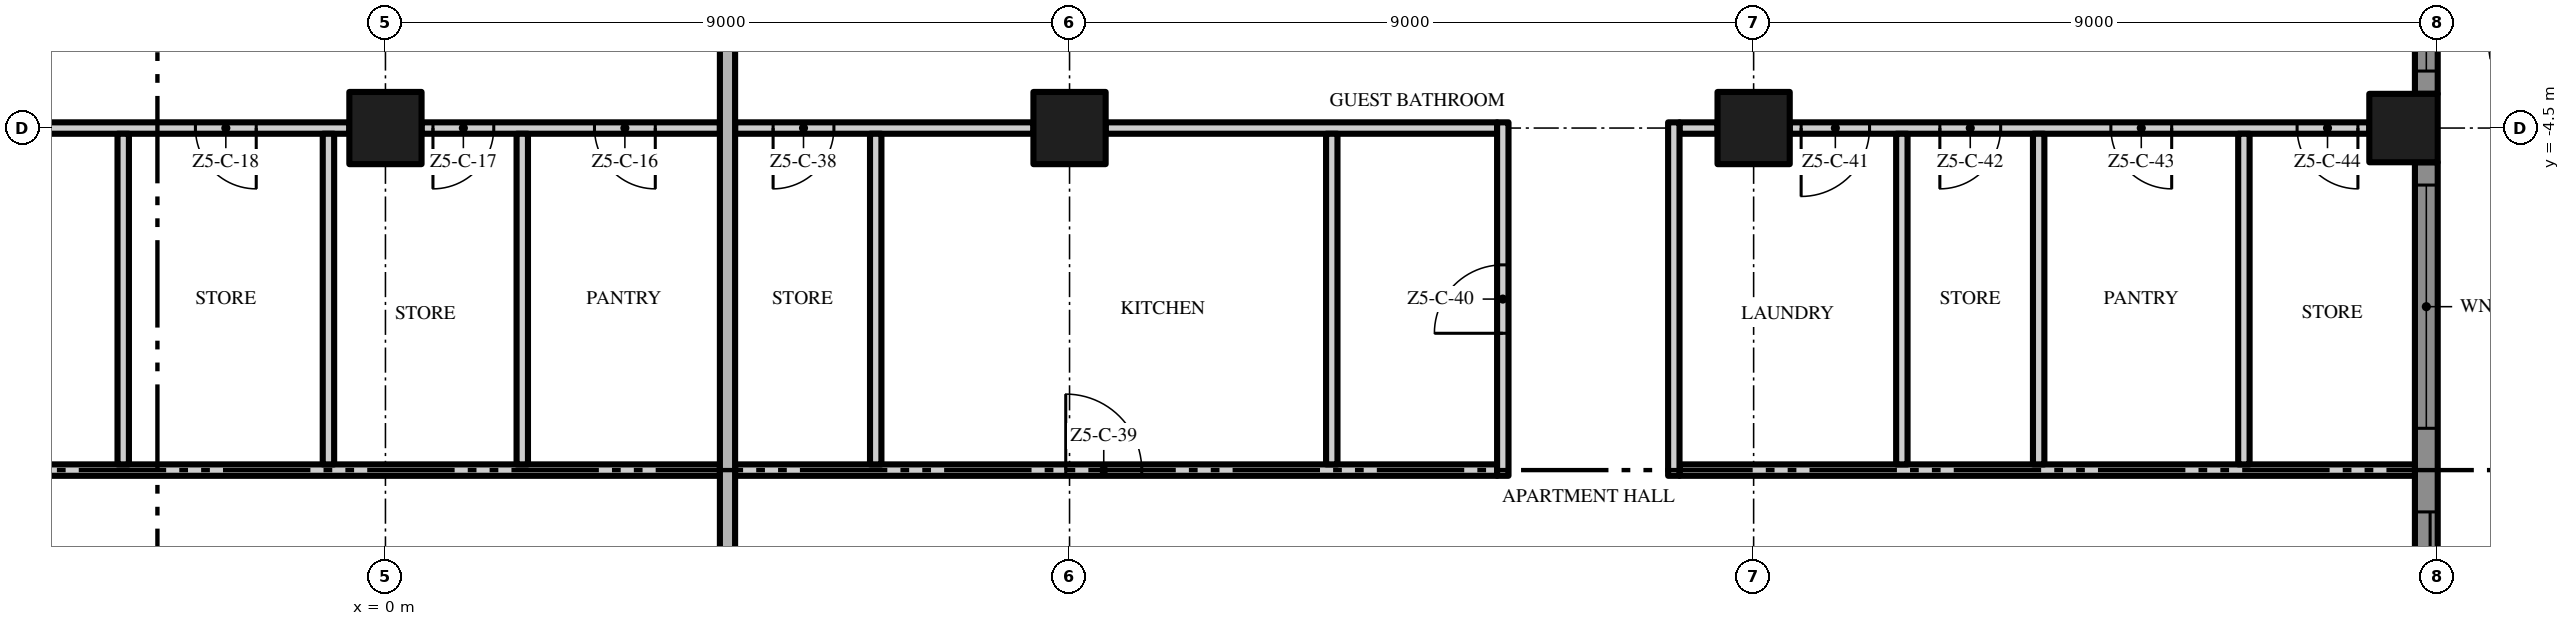
"""IFC4 building model, lengths in metres.
Left out: names, types, materials, properties, quantities, classifications, styles, units other than length and angle.
Written with IfcOpenShell. Run it as: python <this file> out.ifc"""

import sys

from ifc_helpers import new_model, si_unit, direction, frame, frame_2d, origin, origin_2d, place, context, subcontext, project, spatial, polyline, rectangle, outline, extrude, element, fill, save


model = new_model("IFC4")
c1 = context("Model", 3, precision=1e-05, world=origin(), true_north=direction((0.0, 1.0)))
c2 = subcontext(c1, "Body", "Model", "MODEL_VIEW")
j1 = project(units=[si_unit("LENGTHUNIT", "METRE"), si_unit("PLANEANGLEUNIT", "RADIAN")], contexts=[c1])
p1 = place(None, origin())
s1 = spatial("IfcSite", under=j1, at=p1, CompositionType="ELEMENT")
p2 = place(p1, origin())
s2 = spatial("IfcBuilding", under=s1, at=p2, CompositionType="ELEMENT")
p3 = place(p2, frame((0.0, 0.0, 265.4)))
s3 = spatial("IfcBuildingStorey", under=s2, at=p3, CompositionType="ELEMENT", Elevation=265.4)
for number, where, z_axis, x_axis in (
    (1, (0.0, -4.5, 0.0), (0.0, 0.0, 1.0), (1.0, 0.0, 0.0)),
    (2, (18.0, -4.5, 0.0), (0.0, 0.0, 1.0), (1.0, 0.0, 0.0)),
):
    element("IfcColumn", number, at=place(p3, frame(where, z_axis=z_axis, x_axis=x_axis)), inside=s3, PredefinedType="COLUMN", context=c2, shape_type="SweptSolid", body=[
        extrude(rectangle(XDim=0.95, YDim=0.95, at=origin_2d()), origin(), (0.0, 0.0, 1.0), 3.5),
    ])
p4 = place(p3, frame((26.55, -4.5, 0.0), z_axis=(0.0, 0.0, 1.0), x_axis=(1.0, 0.0, 0.0)))
e3 = element("IfcColumn", 3, at=p4, inside=s3, PredefinedType="COLUMN", context=c2, shape_type="SweptSolid", body=[
    extrude(rectangle(XDim=0.9, YDim=0.9, at=origin_2d()), origin(), (0.0, 0.0, 1.0), 3.5),
])
p5 = place(p3, frame((9.0, -4.5, 0.0), z_axis=(0.0, 0.0, 1.0), x_axis=(1.0, 0.0, 0.0)))
e4 = element("IfcColumn", 4, at=p5, inside=s3, PredefinedType="COLUMN", context=c2, shape_type="SweptSolid", body=[
    extrude(rectangle(XDim=0.95, YDim=0.95, at=origin_2d()), origin(), (0.0, 0.0, 1.0), 3.5),
])
p6 = place(p3, frame((26.85, -4.95, 0.0), z_axis=(0.0, 0.0, 1.0), x_axis=(0.0, -1.0, 0.0)))
e5 = element("IfcWall", 5, at=p6, inside=s3, PredefinedType="SOLIDWALL", context=c2, shape_type="SweptSolid", body=[
    extrude(rectangle(XDim=8.1, YDim=0.3, at=frame_2d((4.05, 0.0))), origin(), (0.0, 0.0, 1.0), 3.5),
])
p7 = place(p6, frame((4.6, 0.0, 0.0)))
e6 = element("IfcOpeningElement", 6, at=p7, cuts=e5, PredefinedType="OPENING", context=c2, shape_type="SweptSolid", body=[
    extrude(rectangle(XDim=3.2, YDim=2.4, at=frame_2d((1.6, 1.2))), frame((0.0, 0.16, 0.0), z_axis=(0.0, -1.0, 0.0), x_axis=(1.0, 0.0, 0.0)), (0.0, 0.0, 1.0), 0.32),
])
p8 = place(p6, frame((0.3, 0.0, 0.45)))
e7 = element("IfcOpeningElement", 7, at=p8, cuts=e5, PredefinedType="OPENING", context=c2, shape_type="SweptSolid", body=[
    extrude(rectangle(XDim=3.2, YDim=2.65, at=frame_2d((1.6, 1.325))), frame((0.0, 0.16, 0.0), z_axis=(0.0, -1.0, 0.0), x_axis=(1.0, 0.0, 0.0)), (0.0, 0.0, 1.0), 0.32),
])
p9 = place(p3, frame((26.85, 4.05, 0.0), z_axis=(0.0, 0.0, 1.0), x_axis=(0.0, -1.0, 0.0)))
e8 = element("IfcWall", 8, at=p9, inside=s3, PredefinedType="SOLIDWALL", context=c2, shape_type="SweptSolid", body=[
    extrude(rectangle(XDim=8.1, YDim=0.3, at=frame_2d((4.05, 0.0))), origin(), (0.0, 0.0, 1.0), 3.5),
])
p10 = place(p9, frame((4.6, 0.0, 0.45)))
e9 = element("IfcOpeningElement", 9, at=p10, cuts=e8, PredefinedType="OPENING", context=c2, shape_type="SweptSolid", body=[
    extrude(rectangle(XDim=3.2, YDim=2.65, at=frame_2d((1.6, 1.325))), frame((0.0, 0.16, 0.0), z_axis=(0.0, -1.0, 0.0), x_axis=(1.0, 0.0, 0.0)), (0.0, 0.0, 1.0), 0.32),
])
p11 = place(p9, frame((0.3, 0.0, 0.0)))
e10 = element("IfcOpeningElement", 10, at=p11, cuts=e8, PredefinedType="OPENING", context=c2, shape_type="SweptSolid", body=[
    extrude(rectangle(XDim=3.2, YDim=2.4, at=frame_2d((1.6, 1.2))), frame((0.0, 0.16, 0.0), z_axis=(0.0, -1.0, 0.0), x_axis=(1.0, 0.0, 0.0)), (0.0, 0.0, 1.0), 0.32),
])
p12 = place(p3, origin())
e11 = element("IfcWall", 11, at=p12, inside=s3, PredefinedType="USERDEFINED", context=c2, shape_type="SweptSolid", body=[
    extrude(outline(polyline([(27.6, -18.0), (27.829, -16.5), (28.429, -15.0), (29.171, -13.5), (29.771, -12.0), (30.0, -10.5), (29.771, -9.0), (29.171, -7.5), (28.429, -6.0), (27.829, -4.5), (27.6, -3.0), (27.829, -1.5), (28.429, 0.0), (29.171, 1.5), (29.771, 3.0), (30.0, 4.5), (29.771, 6.0), (29.171, 7.5), (28.429, 9.0), (27.829, 10.5), (27.6, 12.0), (27.829, 13.5), (28.429, 15.0), (29.171, 16.5), (29.771, 18.0), (29.539, 18.093), (28.942, 16.602), (28.201, 15.102), (27.586, 13.566), (27.347, 12.0), (27.586, 10.434), (28.201, 8.898), (28.942, 7.398), (29.528, 5.934), (29.747, 4.5), (29.528, 3.066), (28.942, 1.602), (28.201, 0.102), (27.586, -1.434), (27.347, -3.0), (27.586, -4.566), (28.201, -6.102), (28.942, -7.602), (29.528, -9.066), (29.747, -10.5), (29.528, -11.934), (28.942, -13.398), (28.201, -14.898), (27.586, -16.434), (27.353, -17.962), (27.6, -18.0)])), origin(), (0.0, 0.0, 1.0), 0.9),
])
p13 = place(p3, frame((-11.625, -9.0, 0.0), z_axis=(0.0, 0.0, 1.0), x_axis=(1.0, 0.0, 0.0)))
e12 = element("IfcWall", 12, at=p13, inside=s3, PredefinedType="PARTITIONING", context=c2, shape_type="SweptSolid", body=[
    extrude(rectangle(XDim=16.025, YDim=0.15, at=frame_2d((8.012, 0.0))), origin(), (0.0, 0.0, 1.0), 3.5),
])
p14 = place(p13, frame((4.675, 0.0, 0.0)))
e13 = element("IfcOpeningElement", 13, at=p14, cuts=e12, PredefinedType="OPENING", context=c2, shape_type="SweptSolid", body=[
    extrude(rectangle(XDim=1.0, YDim=2.4, at=frame_2d((0.5, 1.2))), frame((0.0, 0.085, 0.0), z_axis=(0.0, -1.0, 0.0), x_axis=(1.0, 0.0, 0.0)), (0.0, 0.0, 1.0), 0.17),
])
p15 = place(p3, frame((4.6, -9.0, 0.0), z_axis=(0.0, 0.0, 1.0), x_axis=(1.0, 0.0, 0.0)))
e14 = element("IfcWall", 14, at=p15, inside=s3, PredefinedType="PARTITIONING", context=c2, shape_type="SweptSolid", body=[
    extrude(rectangle(XDim=10.025, YDim=0.15, at=frame_2d((5.013, 0.0))), origin(), (0.0, 0.0, 1.0), 3.5),
])
p16 = place(p15, frame((4.35, 0.0, 0.0)))
e15 = element("IfcOpeningElement", 15, at=p16, cuts=e14, PredefinedType="OPENING", context=c2, shape_type="SweptSolid", body=[
    extrude(rectangle(XDim=1.0, YDim=2.4, at=frame_2d((0.5, 1.2))), frame((0.0, 0.085, 0.0), z_axis=(0.0, -1.0, 0.0), x_axis=(1.0, 0.0, 0.0)), (0.0, 0.0, 1.0), 0.17),
])
p17 = place(p3, frame((17.025, -9.0, 0.0), z_axis=(0.0, 0.0, 1.0), x_axis=(1.0, 0.0, 0.0)))
e16 = element("IfcWall", 16, at=p17, inside=s3, PredefinedType="PARTITIONING", context=c2, shape_type="SweptSolid", body=[
    extrude(rectangle(XDim=9.675, YDim=0.15, at=frame_2d((4.838, 0.0))), origin(), (0.0, 0.0, 1.0), 3.5),
])
p18 = place(p3, frame((-0.475, -4.5, 0.0), z_axis=(0.0, 0.0, 1.0), x_axis=(-1.0, 0.0, 0.0)))
e17 = element("IfcWall", 17, at=p18, inside=s3, PredefinedType="PARTITIONING", context=c2, shape_type="SweptSolid", body=[
    extrude(rectangle(XDim=8.05, YDim=0.15, at=frame_2d((4.025, 0.0))), origin(), (0.0, 0.0, 1.0), 3.5),
])
p19 = place(p18, frame((1.225, 0.0, 0.0)))
e18 = element("IfcOpeningElement", 18, at=p19, cuts=e17, PredefinedType="OPENING", context=c2, shape_type="SweptSolid", body=[
    extrude(rectangle(XDim=0.8, YDim=2.0, at=frame_2d((0.4, 1.0))), frame((0.0, 0.085, 0.0), z_axis=(0.0, -1.0, 0.0), x_axis=(1.0, 0.0, 0.0)), (0.0, 0.0, 1.0), 0.17),
])
p20 = place(p3, frame((4.4, -4.5, 0.0), z_axis=(0.0, 0.0, 1.0), x_axis=(-1.0, 0.0, 0.0)))
e19 = element("IfcWall", 19, at=p20, inside=s3, PredefinedType="PARTITIONING", context=c2, shape_type="SweptSolid", body=[
    extrude(rectangle(XDim=3.925, YDim=0.15, at=frame_2d((1.962, 0.0))), origin(), (0.0, 0.0, 1.0), 3.5),
])
p21 = place(p20, frame((0.85, 0.0, 0.0)))
e20 = element("IfcOpeningElement", 20, at=p21, cuts=e19, PredefinedType="OPENING", context=c2, shape_type="SweptSolid", body=[
    extrude(rectangle(XDim=0.8, YDim=2.0, at=frame_2d((0.4, 1.0))), frame((0.0, 0.085, 0.0), z_axis=(0.0, -1.0, 0.0), x_axis=(1.0, 0.0, 0.0)), (0.0, 0.0, 1.0), 0.17),
])
p22 = place(p20, frame((2.975, 0.0, 0.0)))
e21 = element("IfcOpeningElement", 21, at=p22, cuts=e19, PredefinedType="OPENING", context=c2, shape_type="SweptSolid", body=[
    extrude(rectangle(XDim=0.8, YDim=2.0, at=frame_2d((0.4, 1.0))), frame((0.0, 0.085, 0.0), z_axis=(0.0, -1.0, 0.0), x_axis=(1.0, 0.0, 0.0)), (0.0, 0.0, 1.0), 0.17),
])
p23 = place(p3, frame((8.525, -4.5, 0.0), z_axis=(0.0, 0.0, 1.0), x_axis=(-1.0, 0.0, 0.0)))
e22 = element("IfcWall", 22, at=p23, inside=s3, PredefinedType="PARTITIONING", context=c2, shape_type="SweptSolid", body=[
    extrude(rectangle(XDim=3.925, YDim=0.15, at=frame_2d((1.962, 0.0))), origin(), (0.0, 0.0, 1.0), 3.5),
])
p24 = place(p23, frame((2.625, 0.0, 0.0)))
e23 = element("IfcOpeningElement", 23, at=p24, cuts=e22, PredefinedType="OPENING", context=c2, shape_type="SweptSolid", body=[
    extrude(rectangle(XDim=0.8, YDim=2.0, at=frame_2d((0.4, 1.0))), frame((0.0, 0.085, 0.0), z_axis=(0.0, -1.0, 0.0), x_axis=(1.0, 0.0, 0.0)), (0.0, 0.0, 1.0), 0.17),
])
p25 = place(p3, frame((9.475, -4.5, 0.0), z_axis=(0.0, 0.0, 1.0), x_axis=(1.0, 0.0, 0.0)))
e24 = element("IfcWall", 24, at=p25, inside=s3, PredefinedType="PARTITIONING", context=c2, shape_type="SweptSolid", body=[
    extrude(rectangle(XDim=5.15, YDim=0.15, at=frame_2d((2.575, 0.0))), origin(), (0.0, 0.0, 1.0), 3.5),
])
p26 = place(p3, frame((17.025, -4.5, 0.0), z_axis=(0.0, 0.0, 1.0), x_axis=(1.0, 0.0, 0.0)))
e25 = element("IfcWall", 25, at=p26, inside=s3, PredefinedType="PARTITIONING", context=c2, shape_type="SweptSolid", body=[
    extrude(rectangle(XDim=0.5, YDim=0.15, at=frame_2d((0.25, 0.0))), origin(), (0.0, 0.0, 1.0), 3.5),
])
p27 = place(p3, frame((26.1, -4.5, 0.0), z_axis=(0.0, 0.0, 1.0), x_axis=(-1.0, 0.0, 0.0)))
e26 = element("IfcWall", 26, at=p27, inside=s3, PredefinedType="PARTITIONING", context=c2, shape_type="SweptSolid", body=[
    extrude(rectangle(XDim=7.625, YDim=0.15, at=frame_2d((3.812, 0.0))), origin(), (0.0, 0.0, 1.0), 3.5),
])
p28 = place(p27, frame((6.575, 0.0, 0.0)))
e27 = element("IfcOpeningElement", 27, at=p28, cuts=e26, PredefinedType="OPENING", context=c2, shape_type="SweptSolid", body=[
    extrude(rectangle(XDim=0.9, YDim=2.1, at=frame_2d((0.45, 1.05))), frame((0.0, 0.085, 0.0), z_axis=(0.0, -1.0, 0.0), x_axis=(1.0, 0.0, 0.0)), (0.0, 0.0, 1.0), 0.17),
])
p29 = place(p27, frame((4.85, 0.0, 0.0)))
e28 = element("IfcOpeningElement", 28, at=p29, cuts=e26, PredefinedType="OPENING", context=c2, shape_type="SweptSolid", body=[
    extrude(rectangle(XDim=0.8, YDim=2.0, at=frame_2d((0.4, 1.0))), frame((0.0, 0.085, 0.0), z_axis=(0.0, -1.0, 0.0), x_axis=(1.0, 0.0, 0.0)), (0.0, 0.0, 1.0), 0.17),
])
p30 = place(p27, frame((2.6, 0.0, 0.0)))
e29 = element("IfcOpeningElement", 29, at=p30, cuts=e26, PredefinedType="OPENING", context=c2, shape_type="SweptSolid", body=[
    extrude(rectangle(XDim=0.8, YDim=2.0, at=frame_2d((0.4, 1.0))), frame((0.0, 0.085, 0.0), z_axis=(0.0, -1.0, 0.0), x_axis=(1.0, 0.0, 0.0)), (0.0, 0.0, 1.0), 0.17),
])
p31 = place(p27, frame((0.15, 0.0, 0.0)))
e30 = element("IfcOpeningElement", 30, at=p31, cuts=e26, PredefinedType="OPENING", context=c2, shape_type="SweptSolid", body=[
    extrude(rectangle(XDim=0.8, YDim=2.0, at=frame_2d((0.4, 1.0))), frame((0.0, 0.085, 0.0), z_axis=(0.0, -1.0, 0.0), x_axis=(1.0, 0.0, 0.0)), (0.0, 0.0, 1.0), 0.17),
])
for number, where, z_axis, x_axis in (
    (31, (-3.45, -8.925, 0.0), (0.0, 0.0, 1.0), (0.0, 1.0, 0.0)),
    (32, (-0.75, -8.925, 0.0), (0.0, 0.0, 1.0), (0.0, 1.0, 0.0)),
    (33, (1.8, -8.925, 0.0), (0.0, 0.0, 1.0), (0.0, 1.0, 0.0)),
):
    element("IfcWall", number, at=place(p3, frame(where, z_axis=z_axis, x_axis=x_axis)), inside=s3, PredefinedType="PARTITIONING", context=c2, shape_type="SweptSolid", body=[
        extrude(rectangle(XDim=4.35, YDim=0.15, at=frame_2d((2.175, 0.0))), origin(), (0.0, 0.0, 1.0), 3.5),
    ])
p32 = place(p3, frame((4.5, -22.2, 0.0), z_axis=(0.0, 0.0, 1.0), x_axis=(0.0, 1.0, 0.0)))
e34 = element("IfcWall", 34, at=p32, inside=s3, PredefinedType="PARTITIONING", context=c2, shape_type="SweptSolid", body=[
    extrude(rectangle(XDim=22.1, YDim=0.2, at=frame_2d((11.05, 0.0))), origin(), (0.0, 0.0, 1.0), 3.5),
])
for number, where, z_axis, x_axis in (
    (35, (6.45, -8.925, 0.0), (0.0, 0.0, 1.0), (0.0, 1.0, 0.0)),
    (36, (12.45, -8.925, 0.0), (0.0, 0.0, 1.0), (0.0, 1.0, 0.0)),
):
    element("IfcWall", number, at=place(p3, frame(where, z_axis=z_axis, x_axis=x_axis)), inside=s3, PredefinedType="PARTITIONING", context=c2, shape_type="SweptSolid", body=[
        extrude(rectangle(XDim=4.35, YDim=0.15, at=frame_2d((2.175, 0.0))), origin(), (0.0, 0.0, 1.0), 3.5),
    ])
p33 = place(p3, frame((14.7, -9.075, 0.0), z_axis=(0.0, 0.0, 1.0), x_axis=(0.0, 1.0, 0.0)))
e37 = element("IfcWall", 37, at=p33, inside=s3, PredefinedType="PARTITIONING", context=c2, shape_type="SweptSolid", body=[
    extrude(rectangle(XDim=4.65, YDim=0.15, at=frame_2d((2.325, 0.0))), origin(), (0.0, 0.0, 1.0), 3.5),
])
p34 = place(p33, frame((1.875, 0.0, 0.0)))
e38 = element("IfcOpeningElement", 38, at=p34, cuts=e37, PredefinedType="OPENING", context=c2, shape_type="SweptSolid", body=[
    extrude(rectangle(XDim=0.9, YDim=2.1, at=frame_2d((0.45, 1.05))), frame((0.0, 0.085, 0.0), z_axis=(0.0, -1.0, 0.0), x_axis=(1.0, 0.0, 0.0)), (0.0, 0.0, 1.0), 0.17),
])
p35 = place(p3, frame((16.95, -9.075, 0.0), z_axis=(0.0, 0.0, 1.0), x_axis=(0.0, 1.0, 0.0)))
e39 = element("IfcWall", 39, at=p35, inside=s3, PredefinedType="PARTITIONING", context=c2, shape_type="SweptSolid", body=[
    extrude(rectangle(XDim=4.65, YDim=0.15, at=frame_2d((2.325, 0.0))), origin(), (0.0, 0.0, 1.0), 3.5),
])
for number, where, z_axis, x_axis in (
    (40, (19.95, -8.925, 0.0), (0.0, 0.0, 1.0), (0.0, 1.0, 0.0)),
    (41, (21.75, -8.925, 0.0), (0.0, 0.0, 1.0), (0.0, 1.0, 0.0)),
    (42, (24.45, -8.925, 0.0), (0.0, 0.0, 1.0), (0.0, 1.0, 0.0)),
):
    element("IfcWall", number, at=place(p3, frame(where, z_axis=z_axis, x_axis=x_axis)), inside=s3, PredefinedType="PARTITIONING", context=c2, shape_type="SweptSolid", body=[
        extrude(rectangle(XDim=4.35, YDim=0.15, at=frame_2d((2.175, 0.0))), origin(), (0.0, 0.0, 1.0), 3.5),
    ])
p36 = place(p7, origin())
e43 = element("IfcDoor", 43, at=p36, inside=s3, OperationType="SINGLE_SWING_LEFT", PredefinedType="DOOR", context=c2, shape_type="SweptSolid", body=[
    extrude(rectangle(XDim=3.2, YDim=2.4, at=frame_2d((1.6, 1.2))), frame((0.0, 0.025, 0.0), z_axis=(0.0, -1.0, 0.0), x_axis=(1.0, 0.0, 0.0)), (0.0, 0.0, 1.0), 0.05),
])
fill(e6, e43)
p37 = place(p8, origin())
e44 = element("IfcWindow", 44, at=p37, inside=s3, PartitioningType="SINGLE_PANEL", PredefinedType="WINDOW", context=c2, shape_type="SweptSolid", body=[
    extrude(rectangle(XDim=3.2, YDim=2.65, at=frame_2d((1.6, 1.325))), frame((0.0, 0.03, 0.0), z_axis=(0.0, -1.0, 0.0), x_axis=(1.0, 0.0, 0.0)), (0.0, 0.0, 1.0), 0.06),
])
fill(e7, e44)
p38 = place(p10, origin())
e45 = element("IfcWindow", 45, at=p38, inside=s3, PartitioningType="SINGLE_PANEL", PredefinedType="WINDOW", context=c2, shape_type="SweptSolid", body=[
    extrude(rectangle(XDim=3.2, YDim=2.65, at=frame_2d((1.6, 1.325))), frame((0.0, 0.03, 0.0), z_axis=(0.0, -1.0, 0.0), x_axis=(1.0, 0.0, 0.0)), (0.0, 0.0, 1.0), 0.06),
])
fill(e9, e45)
p39 = place(p21, origin())
e46 = element("IfcDoor", 46, at=p39, inside=s3, OperationType="SINGLE_SWING_LEFT", PredefinedType="DOOR", context=c2, shape_type="SweptSolid", body=[
    extrude(rectangle(XDim=0.8, YDim=2.0, at=frame_2d((0.4, 1.0))), frame((0.0, 0.025, 0.0), z_axis=(0.0, -1.0, 0.0), x_axis=(1.0, 0.0, 0.0)), (0.0, 0.0, 1.0), 0.05),
])
fill(e20, e46)
p40 = place(p22, origin())
e47 = element("IfcDoor", 47, at=p40, inside=s3, OperationType="SINGLE_SWING_RIGHT", PredefinedType="DOOR", context=c2, shape_type="SweptSolid", body=[
    extrude(rectangle(XDim=0.8, YDim=2.0, at=frame_2d((0.4, 1.0))), frame((0.0, 0.025, 0.0), z_axis=(0.0, -1.0, 0.0), x_axis=(1.0, 0.0, 0.0)), (0.0, 0.0, 1.0), 0.05),
])
fill(e21, e47)
p41 = place(p19, origin())
e48 = element("IfcDoor", 48, at=p41, inside=s3, OperationType="SINGLE_SWING_LEFT", PredefinedType="DOOR", context=c2, shape_type="SweptSolid", body=[
    extrude(rectangle(XDim=0.8, YDim=2.0, at=frame_2d((0.4, 1.0))), frame((0.0, 0.025, 0.0), z_axis=(0.0, -1.0, 0.0), x_axis=(1.0, 0.0, 0.0)), (0.0, 0.0, 1.0), 0.05),
])
fill(e18, e48)
p42 = place(p24, origin())
e49 = element("IfcDoor", 49, at=p42, inside=s3, OperationType="SINGLE_SWING_RIGHT", PredefinedType="DOOR", context=c2, shape_type="SweptSolid", body=[
    extrude(rectangle(XDim=0.8, YDim=2.0, at=frame_2d((0.4, 1.0))), frame((0.0, 0.025, 0.0), z_axis=(0.0, -1.0, 0.0), x_axis=(1.0, 0.0, 0.0)), (0.0, 0.0, 1.0), 0.05),
])
fill(e23, e49)
p43 = place(p16, origin())
e50 = element("IfcDoor", 50, at=p43, inside=s3, OperationType="SINGLE_SWING_LEFT", PredefinedType="DOOR", context=c2, shape_type="SweptSolid", body=[
    extrude(rectangle(XDim=1.0, YDim=2.4, at=frame_2d((0.5, 1.2))), frame((0.0, 0.025, 0.0), z_axis=(0.0, -1.0, 0.0), x_axis=(1.0, 0.0, 0.0)), (0.0, 0.0, 1.0), 0.05),
])
fill(e15, e50)
p44 = place(p34, origin())
e51 = element("IfcDoor", 51, at=p44, inside=s3, OperationType="SINGLE_SWING_LEFT", PredefinedType="DOOR", context=c2, shape_type="SweptSolid", body=[
    extrude(rectangle(XDim=0.9, YDim=2.1, at=frame_2d((0.45, 1.05))), frame((0.0, 0.025, 0.0), z_axis=(0.0, -1.0, 0.0), x_axis=(1.0, 0.0, 0.0)), (0.0, 0.0, 1.0), 0.05),
])
fill(e38, e51)
p45 = place(p28, origin())
e52 = element("IfcDoor", 52, at=p45, inside=s3, OperationType="SINGLE_SWING_RIGHT", PredefinedType="DOOR", context=c2, shape_type="SweptSolid", body=[
    extrude(rectangle(XDim=0.9, YDim=2.1, at=frame_2d((0.45, 1.05))), frame((0.0, 0.025, 0.0), z_axis=(0.0, -1.0, 0.0), x_axis=(1.0, 0.0, 0.0)), (0.0, 0.0, 1.0), 0.05),
])
fill(e27, e52)
p46 = place(p29, origin())
e53 = element("IfcDoor", 53, at=p46, inside=s3, OperationType="SINGLE_SWING_RIGHT", PredefinedType="DOOR", context=c2, shape_type="SweptSolid", body=[
    extrude(rectangle(XDim=0.8, YDim=2.0, at=frame_2d((0.4, 1.0))), frame((0.0, 0.025, 0.0), z_axis=(0.0, -1.0, 0.0), x_axis=(1.0, 0.0, 0.0)), (0.0, 0.0, 1.0), 0.05),
])
fill(e28, e53)
p47 = place(p30, origin())
e54 = element("IfcDoor", 54, at=p47, inside=s3, OperationType="SINGLE_SWING_LEFT", PredefinedType="DOOR", context=c2, shape_type="SweptSolid", body=[
    extrude(rectangle(XDim=0.8, YDim=2.0, at=frame_2d((0.4, 1.0))), frame((0.0, 0.025, 0.0), z_axis=(0.0, -1.0, 0.0), x_axis=(1.0, 0.0, 0.0)), (0.0, 0.0, 1.0), 0.05),
])
fill(e29, e54)
p48 = place(p31, origin())
e55 = element("IfcDoor", 55, at=p48, inside=s3, OperationType="SINGLE_SWING_LEFT", PredefinedType="DOOR", context=c2, shape_type="SweptSolid", body=[
    extrude(rectangle(XDim=0.8, YDim=2.0, at=frame_2d((0.4, 1.0))), frame((0.0, 0.025, 0.0), z_axis=(0.0, -1.0, 0.0), x_axis=(1.0, 0.0, 0.0)), (0.0, 0.0, 1.0), 0.05),
])
fill(e30, e55)
save(model, sys.argv[1])
